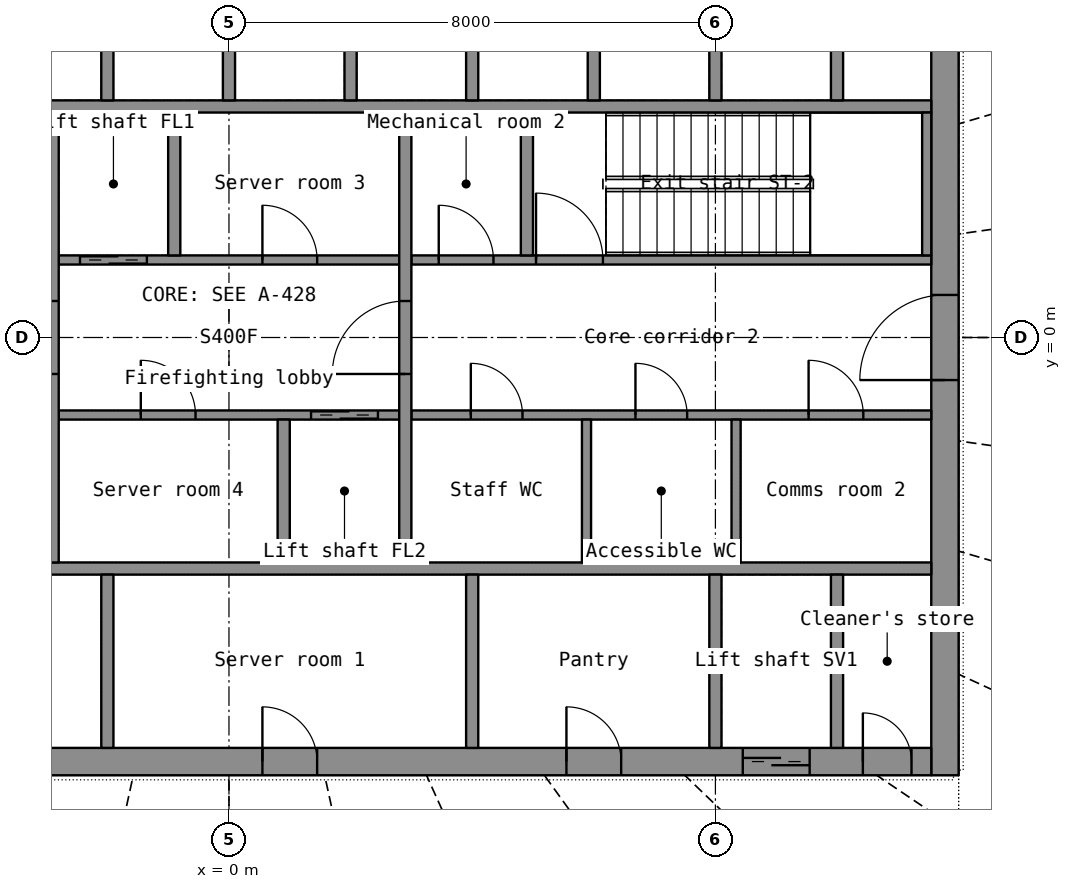
"""IFC4 building model, lengths in metres.
Left out: names, types, materials, properties, quantities, classifications, styles, units other than length and angle.
Written with IfcOpenShell. Run it as: python <this file> out.ifc"""

import sys

from ifc_helpers import new_model, si_unit, direction, frame, frame_2d, origin, place, context, subcontext, project, spatial, rectangle, extrude, element, fill, save


model = new_model("IFC4")
c1 = context("Model", 3, precision=1e-05, world=origin(), true_north=direction((0.0, 1.0)))
c2 = subcontext(c1, "Body", "Model", "MODEL_VIEW")
j1 = project(units=[si_unit("LENGTHUNIT", "METRE"), si_unit("PLANEANGLEUNIT", "RADIAN")], contexts=[c1])
p1 = place(None, origin())
s1 = spatial("IfcSite", under=j1, at=p1, CompositionType="ELEMENT")
p2 = place(p1, origin())
s2 = spatial("IfcBuilding", under=s1, at=p2, CompositionType="ELEMENT")
p3 = place(p2, frame((0.0, 0.0, 212.6)))
s3 = spatial("IfcBuildingStorey", under=s2, at=p3, CompositionType="ELEMENT", Elevation=212.6)
p4 = place(p3, frame((11.775, -7.2, 0.0), z_axis=(0.0, 0.0, 1.0), x_axis=(0.0, 1.0, 0.0)))
e1 = element("IfcWall", 1, at=p4, inside=s3, PredefinedType="SHEAR", context=c2, shape_type="SweptSolid", body=[
    extrude(rectangle(XDim=14.4, YDim=0.45, at=frame_2d((7.2, 0.0))), origin(), (0.0, 0.0, 1.0), 4.1),
])
p5 = place(p4, frame((6.5, 0.0, 0.0)))
e2 = element("IfcOpeningElement", 2, at=p5, cuts=e1, PredefinedType="OPENING", context=c2, shape_type="SweptSolid", body=[
    extrude(rectangle(XDim=1.4, YDim=2.2, at=frame_2d((0.7, 1.1))), frame((0.0, 0.235, 0.0), z_axis=(0.0, -1.0, 0.0), x_axis=(1.0, 0.0, 0.0)), (0.0, 0.0, 1.0), 0.47),
])
p6 = place(p3, frame((-11.55, -6.975, 0.0), z_axis=(0.0, 0.0, 1.0), x_axis=(1.0, 0.0, 0.0)))
e3 = element("IfcWall", 3, at=p6, inside=s3, PredefinedType="SHEAR", context=c2, shape_type="SweptSolid", body=[
    extrude(rectangle(XDim=23.1, YDim=0.45, at=frame_2d((11.55, 0.0))), origin(), (0.0, 0.0, 1.0), 4.1),
])
p7 = place(p6, frame((20.0, 0.0, 0.0)))
e4 = element("IfcOpeningElement", 4, at=p7, cuts=e3, PredefinedType="OPENING", context=c2, shape_type="SweptSolid", body=[
    extrude(rectangle(XDim=1.1, YDim=2.2, at=frame_2d((0.55, 1.1))), frame((0.0, 0.235, 0.0), z_axis=(0.0, -1.0, 0.0), x_axis=(1.0, 0.0, 0.0)), (0.0, 0.0, 1.0), 0.47),
])
p8 = place(p6, frame((5.1, 0.0, 0.0)))
e5 = element("IfcOpeningElement", 5, at=p8, cuts=e3, PredefinedType="OPENING", context=c2, shape_type="SweptSolid", body=[
    extrude(rectangle(XDim=0.9, YDim=2.1, at=frame_2d((0.45, 1.05))), frame((0.0, 0.235, 0.0), z_axis=(0.0, -1.0, 0.0), x_axis=(1.0, 0.0, 0.0)), (0.0, 0.0, 1.0), 0.47),
])
p9 = place(p6, frame((12.1, 0.0, 0.0)))
e6 = element("IfcOpeningElement", 6, at=p9, cuts=e3, PredefinedType="OPENING", context=c2, shape_type="SweptSolid", body=[
    extrude(rectangle(XDim=0.9, YDim=2.1, at=frame_2d((0.45, 1.05))), frame((0.0, 0.235, 0.0), z_axis=(0.0, -1.0, 0.0), x_axis=(1.0, 0.0, 0.0)), (0.0, 0.0, 1.0), 0.47),
])
p10 = place(p6, frame((17.1, 0.0, 0.0)))
e7 = element("IfcOpeningElement", 7, at=p10, cuts=e3, PredefinedType="OPENING", context=c2, shape_type="SweptSolid", body=[
    extrude(rectangle(XDim=0.9, YDim=2.1, at=frame_2d((0.45, 1.05))), frame((0.0, 0.235, 0.0), z_axis=(0.0, -1.0, 0.0), x_axis=(1.0, 0.0, 0.0)), (0.0, 0.0, 1.0), 0.47),
])
p11 = place(p6, frame((0.325, 0.0, 0.0)))
e8 = element("IfcOpeningElement", 8, at=p11, cuts=e3, PredefinedType="OPENING", context=c2, shape_type="SweptSolid", body=[
    extrude(rectangle(XDim=0.8, YDim=2.05, at=frame_2d((0.4, 1.025))), frame((0.0, 0.235, 0.0), z_axis=(0.0, -1.0, 0.0), x_axis=(1.0, 0.0, 0.0)), (0.0, 0.0, 1.0), 0.47),
])
p12 = place(p6, frame((21.975, 0.0, 0.0)))
e9 = element("IfcOpeningElement", 9, at=p12, cuts=e3, PredefinedType="OPENING", context=c2, shape_type="SweptSolid", body=[
    extrude(rectangle(XDim=0.8, YDim=2.05, at=frame_2d((0.4, 1.025))), frame((0.0, 0.235, 0.0), z_axis=(0.0, -1.0, 0.0), x_axis=(1.0, 0.0, 0.0)), (0.0, 0.0, 1.0), 0.47),
])
for number, where, z_axis, x_axis in (
    (10, (-11.55, -3.8, 0.0), (0.0, 0.0, 1.0), (1.0, 0.0, 0.0)),
    (11, (-11.55, 3.8, 0.0), (0.0, 0.0, 1.0), (1.0, 0.0, 0.0)),
):
    element("IfcWall", number, at=place(p3, frame(where, z_axis=z_axis, x_axis=x_axis)), inside=s3, PredefinedType="SHEAR", context=c2, shape_type="SweptSolid", body=[
        extrude(rectangle(XDim=23.1, YDim=0.2, at=frame_2d((11.55, 0.0))), origin(), (0.0, 0.0, 1.0), 4.1),
    ])
for number, where, z_axis, x_axis in (
    (12, (8.0, -6.75, 0.0), (0.0, 0.0, 1.0), (0.0, 1.0, 0.0)),
    (13, (10.0, -6.75, 0.0), (0.0, 0.0, 1.0), (0.0, 1.0, 0.0)),
):
    element("IfcWall", number, at=place(p3, frame(where, z_axis=z_axis, x_axis=x_axis)), inside=s3, PredefinedType="SHEAR", context=c2, shape_type="SweptSolid", body=[
        extrude(rectangle(XDim=2.85, YDim=0.2, at=frame_2d((1.425, 0.0))), origin(), (0.0, 0.0, 1.0), 4.1),
    ])
for number, where, z_axis, x_axis in (
    (14, (-2.0, -6.75, 0.0), (0.0, 0.0, 1.0), (0.0, 1.0, 0.0)),
    (15, (4.0, -6.75, 0.0), (0.0, 0.0, 1.0), (0.0, 1.0, 0.0)),
):
    element("IfcWall", number, at=place(p3, frame(where, z_axis=z_axis, x_axis=x_axis)), inside=s3, PredefinedType="PARTITIONING", context=c2, shape_type="SweptSolid", body=[
        extrude(rectangle(XDim=2.85, YDim=0.2, at=frame_2d((1.425, 0.0))), origin(), (0.0, 0.0, 1.0), 4.1),
    ])
for number, where, z_axis, x_axis in (
    (16, (-2.0, 3.9, 0.0), (0.0, 0.0, 1.0), (0.0, 1.0, 0.0)),
    (17, (0.0, 3.9, 0.0), (0.0, 0.0, 1.0), (0.0, 1.0, 0.0)),
    (18, (2.0, 3.9, 0.0), (0.0, 0.0, 1.0), (0.0, 1.0, 0.0)),
    (19, (4.0, 3.9, 0.0), (0.0, 0.0, 1.0), (0.0, 1.0, 0.0)),
    (20, (6.0, 3.9, 0.0), (0.0, 0.0, 1.0), (0.0, 1.0, 0.0)),
    (21, (8.0, 3.9, 0.0), (0.0, 0.0, 1.0), (0.0, 1.0, 0.0)),
    (22, (10.0, 3.9, 0.0), (0.0, 0.0, 1.0), (0.0, 1.0, 0.0)),
):
    element("IfcWall", number, at=place(p3, frame(where, z_axis=z_axis, x_axis=x_axis)), inside=s3, PredefinedType="SHEAR", context=c2, shape_type="SweptSolid", body=[
        extrude(rectangle(XDim=2.85, YDim=0.2, at=frame_2d((1.425, 0.0))), origin(), (0.0, 0.0, 1.0), 4.1),
    ])
p13 = place(p3, frame((-2.8, -1.275, 0.0), z_axis=(0.0, 0.0, 1.0), x_axis=(1.0, 0.0, 0.0)))
e23 = element("IfcWall", 23, at=p13, inside=s3, PredefinedType="SHEAR", context=c2, shape_type="SweptSolid", body=[
    extrude(rectangle(XDim=5.6, YDim=0.15, at=frame_2d((2.8, 0.0))), origin(), (0.0, 0.0, 1.0), 4.1),
])
p14 = place(p13, frame((4.15, 0.0, 0.0)))
e24 = element("IfcOpeningElement", 24, at=p14, cuts=e23, PredefinedType="OPENING", context=c2, shape_type="SweptSolid", body=[
    extrude(rectangle(XDim=1.1, YDim=2.2, at=frame_2d((0.55, 1.1))), frame((0.0, 0.085, 0.0), z_axis=(0.0, -1.0, 0.0), x_axis=(1.0, 0.0, 0.0)), (0.0, 0.0, 1.0), 0.17),
])
p15 = place(p13, frame((1.35, 0.0, 0.0)))
e25 = element("IfcOpeningElement", 25, at=p15, cuts=e23, PredefinedType="OPENING", context=c2, shape_type="SweptSolid", body=[
    extrude(rectangle(XDim=0.9, YDim=2.1, at=frame_2d((0.45, 1.05))), frame((0.0, 0.085, 0.0), z_axis=(0.0, -1.0, 0.0), x_axis=(1.0, 0.0, 0.0)), (0.0, 0.0, 1.0), 0.17),
])
p16 = place(p3, frame((3.0, -1.275, 0.0), z_axis=(0.0, 0.0, 1.0), x_axis=(1.0, 0.0, 0.0)))
e26 = element("IfcWall", 26, at=p16, inside=s3, PredefinedType="PARTITIONING", context=c2, shape_type="SweptSolid", body=[
    extrude(rectangle(XDim=8.55, YDim=0.15, at=frame_2d((4.275, 0.0))), origin(), (0.0, 0.0, 1.0), 4.1),
])
p17 = place(p16, frame((0.978, 0.0, 0.0)))
e27 = element("IfcOpeningElement", 27, at=p17, cuts=e26, PredefinedType="OPENING", context=c2, shape_type="SweptSolid", body=[
    extrude(rectangle(XDim=0.85, YDim=2.1, at=frame_2d((0.425, 1.05))), frame((0.0, 0.085, 0.0), z_axis=(0.0, -1.0, 0.0), x_axis=(1.0, 0.0, 0.0)), (0.0, 0.0, 1.0), 0.17),
])
p18 = place(p16, frame((3.685, 0.0, 0.0)))
e28 = element("IfcOpeningElement", 28, at=p18, cuts=e26, PredefinedType="OPENING", context=c2, shape_type="SweptSolid", body=[
    extrude(rectangle(XDim=0.85, YDim=2.1, at=frame_2d((0.425, 1.05))), frame((0.0, 0.085, 0.0), z_axis=(0.0, -1.0, 0.0), x_axis=(1.0, 0.0, 0.0)), (0.0, 0.0, 1.0), 0.17),
])
p19 = place(p16, frame((6.532, 0.0, 0.0)))
e29 = element("IfcOpeningElement", 29, at=p19, cuts=e26, PredefinedType="OPENING", context=c2, shape_type="SweptSolid", body=[
    extrude(rectangle(XDim=0.9, YDim=2.1, at=frame_2d((0.45, 1.05))), frame((0.0, 0.085, 0.0), z_axis=(0.0, -1.0, 0.0), x_axis=(1.0, 0.0, 0.0)), (0.0, 0.0, 1.0), 0.17),
])
p20 = place(p3, frame((-2.8, 1.275, 0.0), z_axis=(0.0, 0.0, 1.0), x_axis=(1.0, 0.0, 0.0)))
e30 = element("IfcWall", 30, at=p20, inside=s3, PredefinedType="SHEAR", context=c2, shape_type="SweptSolid", body=[
    extrude(rectangle(XDim=5.6, YDim=0.15, at=frame_2d((2.8, 0.0))), origin(), (0.0, 0.0, 1.0), 4.1),
])
p21 = place(p20, frame((0.35, 0.0, 0.0)))
e31 = element("IfcOpeningElement", 31, at=p21, cuts=e30, PredefinedType="OPENING", context=c2, shape_type="SweptSolid", body=[
    extrude(rectangle(XDim=1.1, YDim=2.2, at=frame_2d((0.55, 1.1))), frame((0.0, 0.085, 0.0), z_axis=(0.0, -1.0, 0.0), x_axis=(1.0, 0.0, 0.0)), (0.0, 0.0, 1.0), 0.17),
])
p22 = place(p20, frame((3.35, 0.0, 0.0)))
e32 = element("IfcOpeningElement", 32, at=p22, cuts=e30, PredefinedType="OPENING", context=c2, shape_type="SweptSolid", body=[
    extrude(rectangle(XDim=0.9, YDim=2.1, at=frame_2d((0.45, 1.05))), frame((0.0, 0.085, 0.0), z_axis=(0.0, -1.0, 0.0), x_axis=(1.0, 0.0, 0.0)), (0.0, 0.0, 1.0), 0.17),
])
p23 = place(p3, frame((3.0, 1.275, 0.0), z_axis=(0.0, 0.0, 1.0), x_axis=(1.0, 0.0, 0.0)))
e33 = element("IfcWall", 33, at=p23, inside=s3, PredefinedType="SHEAR", context=c2, shape_type="SweptSolid", body=[
    extrude(rectangle(XDim=8.55, YDim=0.15, at=frame_2d((4.275, 0.0))), origin(), (0.0, 0.0, 1.0), 4.1),
])
p24 = place(p23, frame((2.05, 0.0, 0.0)))
e34 = element("IfcOpeningElement", 34, at=p24, cuts=e33, PredefinedType="OPENING", context=c2, shape_type="SweptSolid", body=[
    extrude(rectangle(XDim=1.1, YDim=2.15, at=frame_2d((0.55, 1.075))), frame((0.0, 0.085, 0.0), z_axis=(0.0, -1.0, 0.0), x_axis=(1.0, 0.0, 0.0)), (0.0, 0.0, 1.0), 0.17),
])
p25 = place(p23, frame((0.45, 0.0, 0.0)))
e35 = element("IfcOpeningElement", 35, at=p25, cuts=e33, PredefinedType="OPENING", context=c2, shape_type="SweptSolid", body=[
    extrude(rectangle(XDim=0.9, YDim=2.1, at=frame_2d((0.45, 1.05))), frame((0.0, 0.085, 0.0), z_axis=(0.0, -1.0, 0.0), x_axis=(1.0, 0.0, 0.0)), (0.0, 0.0, 1.0), 0.17),
])
p26 = place(p3, frame((-2.9, -3.7, 0.0), z_axis=(0.0, 0.0, 1.0), x_axis=(0.0, 1.0, 0.0)))
e36 = element("IfcWall", 36, at=p26, inside=s3, PredefinedType="SHEAR", context=c2, shape_type="SweptSolid", body=[
    extrude(rectangle(XDim=7.4, YDim=0.2, at=frame_2d((3.7, 0.0))), origin(), (0.0, 0.0, 1.0), 4.1),
])
p27 = place(p26, frame((3.1, 0.0, 0.0)))
e37 = element("IfcOpeningElement", 37, at=p27, cuts=e36, PredefinedType="OPENING", context=c2, shape_type="SweptSolid", body=[
    extrude(rectangle(XDim=1.2, YDim=2.2, at=frame_2d((0.6, 1.1))), frame((0.0, 0.11, 0.0), z_axis=(0.0, -1.0, 0.0), x_axis=(1.0, 0.0, 0.0)), (0.0, 0.0, 1.0), 0.22),
])
p28 = place(p3, frame((2.9, -3.7, 0.0), z_axis=(0.0, 0.0, 1.0), x_axis=(0.0, 1.0, 0.0)))
e38 = element("IfcWall", 38, at=p28, inside=s3, PredefinedType="SHEAR", context=c2, shape_type="SweptSolid", body=[
    extrude(rectangle(XDim=7.4, YDim=0.2, at=frame_2d((3.7, 0.0))), origin(), (0.0, 0.0, 1.0), 4.1),
])
p29 = place(p28, frame((3.1, 0.0, 0.0)))
e39 = element("IfcOpeningElement", 39, at=p29, cuts=e38, PredefinedType="OPENING", context=c2, shape_type="SweptSolid", body=[
    extrude(rectangle(XDim=1.2, YDim=2.2, at=frame_2d((0.6, 1.1))), frame((0.0, 0.11, 0.0), z_axis=(0.0, -1.0, 0.0), x_axis=(1.0, 0.0, 0.0)), (0.0, 0.0, 1.0), 0.22),
])
for number, where, z_axis, x_axis in (
    (40, (-0.9, 1.35, 0.0), (0.0, 0.0, 1.0), (0.0, 1.0, 0.0)),
    (41, (0.9, -3.7, 0.0), (0.0, 0.0, 1.0), (0.0, 1.0, 0.0)),
):
    element("IfcWall", number, at=place(p3, frame(where, z_axis=z_axis, x_axis=x_axis)), inside=s3, PredefinedType="SHEAR", context=c2, shape_type="SweptSolid", body=[
        extrude(rectangle(XDim=2.35, YDim=0.2, at=frame_2d((1.175, 0.0))), origin(), (0.0, 0.0, 1.0), 4.1),
    ])
p30 = place(p3, frame((11.475, 1.35, 0.0), z_axis=(0.0, 0.0, 1.0), x_axis=(0.0, 1.0, 0.0)))
e42 = element("IfcWall", 42, at=p30, inside=s3, PredefinedType="SHEAR", context=c2, shape_type="SweptSolid", body=[
    extrude(rectangle(XDim=2.35, YDim=0.15, at=frame_2d((1.175, 0.0))), origin(), (0.0, 0.0, 1.0), 4.1),
])
p31 = place(p3, frame((4.9, 1.35, 0.0), z_axis=(0.0, 0.0, 1.0), x_axis=(0.0, 1.0, 0.0)))
e43 = element("IfcWall", 43, at=p31, inside=s3, PredefinedType="SHEAR", context=c2, shape_type="SweptSolid", body=[
    extrude(rectangle(XDim=2.35, YDim=0.2, at=frame_2d((1.175, 0.0))), origin(), (0.0, 0.0, 1.0), 4.1),
])
for number, where, z_axis, x_axis in (
    (44, (5.88, -3.7, 0.0), (0.0, 0.0, 1.0), (0.0, 1.0, 0.0)),
    (45, (8.34, -3.7, 0.0), (0.0, 0.0, 1.0), (0.0, 1.0, 0.0)),
):
    element("IfcWall", number, at=place(p3, frame(where, z_axis=z_axis, x_axis=x_axis)), inside=s3, PredefinedType="PARTITIONING", context=c2, shape_type="SweptSolid", body=[
        extrude(rectangle(XDim=2.35, YDim=0.15, at=frame_2d((1.175, 0.0))), origin(), (0.0, 0.0, 1.0), 4.1),
    ])
p32 = place(p7, origin())
e46 = element("IfcDoor", 46, at=p32, inside=s3, OperationType="DOUBLE_DOOR_SLIDING", PredefinedType="DOOR", context=c2, shape_type="SweptSolid", body=[
    extrude(rectangle(XDim=1.1, YDim=2.2, at=frame_2d((0.55, 1.1))), frame((0.0, 0.025, 0.0), z_axis=(0.0, -1.0, 0.0), x_axis=(1.0, 0.0, 0.0)), (0.0, 0.0, 1.0), 0.05),
])
fill(e4, e46)
p33 = place(p9, origin())
e47 = element("IfcDoor", 47, at=p33, inside=s3, OperationType="SINGLE_SWING_LEFT", PredefinedType="DOOR", context=c2, shape_type="SweptSolid", body=[
    extrude(rectangle(XDim=0.9, YDim=2.1, at=frame_2d((0.45, 1.05))), frame((0.0, 0.025, 0.0), z_axis=(0.0, -1.0, 0.0), x_axis=(1.0, 0.0, 0.0)), (0.0, 0.0, 1.0), 0.05),
])
fill(e6, e47)
p34 = place(p10, origin())
e48 = element("IfcDoor", 48, at=p34, inside=s3, OperationType="SINGLE_SWING_LEFT", PredefinedType="DOOR", context=c2, shape_type="SweptSolid", body=[
    extrude(rectangle(XDim=0.9, YDim=2.1, at=frame_2d((0.45, 1.05))), frame((0.0, 0.025, 0.0), z_axis=(0.0, -1.0, 0.0), x_axis=(1.0, 0.0, 0.0)), (0.0, 0.0, 1.0), 0.05),
])
fill(e7, e48)
p35 = place(p12, origin())
e49 = element("IfcDoor", 49, at=p35, inside=s3, OperationType="SINGLE_SWING_LEFT", PredefinedType="DOOR", context=c2, shape_type="SweptSolid", body=[
    extrude(rectangle(XDim=0.8, YDim=2.05, at=frame_2d((0.4, 1.025))), frame((0.0, 0.025, 0.0), z_axis=(0.0, -1.0, 0.0), x_axis=(1.0, 0.0, 0.0)), (0.0, 0.0, 1.0), 0.05),
])
fill(e9, e49)
p36 = place(p5, origin())
e50 = element("IfcDoor", 50, at=p36, inside=s3, OperationType="DOUBLE_DOOR_SINGLE_SWING", PredefinedType="DOOR", context=c2, shape_type="SweptSolid", body=[
    extrude(rectangle(XDim=1.4, YDim=2.2, at=frame_2d((0.7, 1.1))), frame((0.0, 0.025, 0.0), z_axis=(0.0, -1.0, 0.0), x_axis=(1.0, 0.0, 0.0)), (0.0, 0.0, 1.0), 0.05),
])
fill(e2, e50)
p37 = place(p27, origin())
e51 = element("IfcDoor", 51, at=p37, inside=s3, OperationType="SINGLE_SWING_LEFT", PredefinedType="DOOR", context=c2, shape_type="SweptSolid", body=[
    extrude(rectangle(XDim=1.2, YDim=2.2, at=frame_2d((0.6, 1.1))), frame((0.0, 0.025, 0.0), z_axis=(0.0, -1.0, 0.0), x_axis=(1.0, 0.0, 0.0)), (0.0, 0.0, 1.0), 0.05),
])
fill(e37, e51)
p38 = place(p29, origin())
e52 = element("IfcDoor", 52, at=p38, inside=s3, OperationType="SINGLE_SWING_LEFT", PredefinedType="DOOR", context=c2, shape_type="SweptSolid", body=[
    extrude(rectangle(XDim=1.2, YDim=2.2, at=frame_2d((0.6, 1.1))), frame((0.0, 0.025, 0.0), z_axis=(0.0, -1.0, 0.0), x_axis=(1.0, 0.0, 0.0)), (0.0, 0.0, 1.0), 0.05),
])
fill(e39, e52)
p39 = place(p21, origin())
e53 = element("IfcDoor", 53, at=p39, inside=s3, OperationType="DOUBLE_DOOR_SLIDING", PredefinedType="DOOR", context=c2, shape_type="SweptSolid", body=[
    extrude(rectangle(XDim=1.1, YDim=2.2, at=frame_2d((0.55, 1.1))), frame((0.0, 0.025, 0.0), z_axis=(0.0, -1.0, 0.0), x_axis=(1.0, 0.0, 0.0)), (0.0, 0.0, 1.0), 0.05),
])
fill(e31, e53)
p40 = place(p14, origin())
e54 = element("IfcDoor", 54, at=p40, inside=s3, OperationType="DOUBLE_DOOR_SLIDING", PredefinedType="DOOR", context=c2, shape_type="SweptSolid", body=[
    extrude(rectangle(XDim=1.1, YDim=2.2, at=frame_2d((0.55, 1.1))), frame((0.0, 0.025, 0.0), z_axis=(0.0, -1.0, 0.0), x_axis=(1.0, 0.0, 0.0)), (0.0, 0.0, 1.0), 0.05),
])
fill(e24, e54)
p41 = place(p24, origin())
e55 = element("IfcDoor", 55, at=p41, inside=s3, OperationType="SINGLE_SWING_LEFT", PredefinedType="DOOR", context=c2, shape_type="SweptSolid", body=[
    extrude(rectangle(XDim=1.1, YDim=2.15, at=frame_2d((0.55, 1.075))), frame((0.0, 0.025, 0.0), z_axis=(0.0, -1.0, 0.0), x_axis=(1.0, 0.0, 0.0)), (0.0, 0.0, 1.0), 0.05),
])
fill(e34, e55)
p42 = place(p17, origin())
e56 = element("IfcDoor", 56, at=p42, inside=s3, OperationType="SINGLE_SWING_LEFT", PredefinedType="DOOR", context=c2, shape_type="SweptSolid", body=[
    extrude(rectangle(XDim=0.85, YDim=2.1, at=frame_2d((0.425, 1.05))), frame((0.0, 0.025, 0.0), z_axis=(0.0, -1.0, 0.0), x_axis=(1.0, 0.0, 0.0)), (0.0, 0.0, 1.0), 0.05),
])
fill(e27, e56)
p43 = place(p18, origin())
e57 = element("IfcDoor", 57, at=p43, inside=s3, OperationType="SINGLE_SWING_LEFT", PredefinedType="DOOR", context=c2, shape_type="SweptSolid", body=[
    extrude(rectangle(XDim=0.85, YDim=2.1, at=frame_2d((0.425, 1.05))), frame((0.0, 0.025, 0.0), z_axis=(0.0, -1.0, 0.0), x_axis=(1.0, 0.0, 0.0)), (0.0, 0.0, 1.0), 0.05),
])
fill(e28, e57)
p44 = place(p19, origin())
e58 = element("IfcDoor", 58, at=p44, inside=s3, OperationType="SINGLE_SWING_LEFT", PredefinedType="DOOR", context=c2, shape_type="SweptSolid", body=[
    extrude(rectangle(XDim=0.9, YDim=2.1, at=frame_2d((0.45, 1.05))), frame((0.0, 0.025, 0.0), z_axis=(0.0, -1.0, 0.0), x_axis=(1.0, 0.0, 0.0)), (0.0, 0.0, 1.0), 0.05),
])
fill(e29, e58)
p45 = place(p22, origin())
e59 = element("IfcDoor", 59, at=p45, inside=s3, OperationType="SINGLE_SWING_LEFT", PredefinedType="DOOR", context=c2, shape_type="SweptSolid", body=[
    extrude(rectangle(XDim=0.9, YDim=2.1, at=frame_2d((0.45, 1.05))), frame((0.0, 0.025, 0.0), z_axis=(0.0, -1.0, 0.0), x_axis=(1.0, 0.0, 0.0)), (0.0, 0.0, 1.0), 0.05),
])
fill(e32, e59)
p46 = place(p15, origin())
e60 = element("IfcDoor", 60, at=p46, inside=s3, OperationType="SINGLE_SWING_LEFT", PredefinedType="DOOR", context=c2, shape_type="SweptSolid", body=[
    extrude(rectangle(XDim=0.9, YDim=2.1, at=frame_2d((0.45, 1.05))), frame((0.0, 0.025, 0.0), z_axis=(0.0, -1.0, 0.0), x_axis=(1.0, 0.0, 0.0)), (0.0, 0.0, 1.0), 0.05),
])
fill(e25, e60)
p47 = place(p25, origin())
e61 = element("IfcDoor", 61, at=p47, inside=s3, OperationType="SINGLE_SWING_LEFT", PredefinedType="DOOR", context=c2, shape_type="SweptSolid", body=[
    extrude(rectangle(XDim=0.9, YDim=2.1, at=frame_2d((0.45, 1.05))), frame((0.0, 0.025, 0.0), z_axis=(0.0, -1.0, 0.0), x_axis=(1.0, 0.0, 0.0)), (0.0, 0.0, 1.0), 0.05),
])
fill(e35, e61)
save(model, sys.argv[1])
